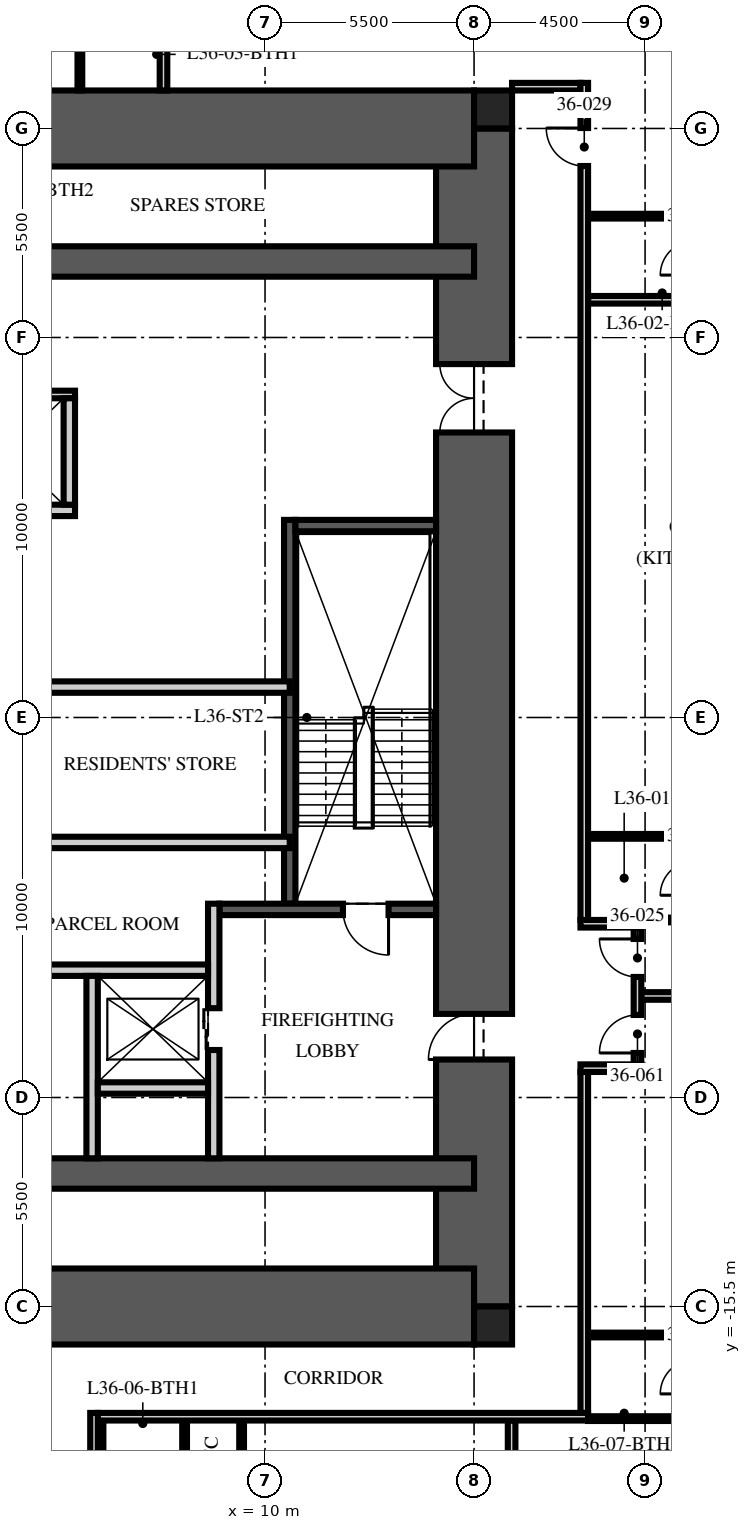
"""IFC4 building model, lengths in metres.
Left out: names, types, materials, properties, quantities, classifications, styles, units other than length and angle.
Written with IfcOpenShell. Run it as: python <this file> out.ifc"""

import sys

from ifc_helpers import new_model, si_unit, direction, frame, frame_2d, origin, origin_2d, place, context, subcontext, project, spatial, rectangle, extrude, element, fill, save


model = new_model("IFC4")
c1 = context("Model", 3, precision=1e-05, world=origin(), true_north=direction((0.0, 1.0)))
c2 = subcontext(c1, "Body", "Model", "MODEL_VIEW")
j1 = project(units=[si_unit("LENGTHUNIT", "METRE"), si_unit("PLANEANGLEUNIT", "RADIAN")], contexts=[c1])
p1 = place(None, origin())
s1 = spatial("IfcSite", under=j1, at=p1, CompositionType="ELEMENT")
p2 = place(p1, origin())
s2 = spatial("IfcBuilding", under=s1, at=p2, CompositionType="ELEMENT")
p3 = place(p2, frame((0.0, 0.0, 144.75)))
s3 = spatial("IfcBuildingStorey", under=s2, at=p3, CompositionType="ELEMENT", Elevation=144.75)
p4 = place(p3, frame((15.5, -15.5, -0.25), z_axis=(0.0, 0.0, 1.0), x_axis=(0.0, 1.0, 0.0)))
e1 = element("IfcWall", 1, at=p4, inside=s3, PredefinedType="SHEAR", context=c2, shape_type="SweptSolid", body=[
    extrude(rectangle(XDim=31.0, YDim=2.0, at=frame_2d((15.5, 0.0))), origin(), (0.0, 0.0, 1.0), 3.75),
])
p5 = place(p4, frame((6.5, 0.0, 0.25)))
e2 = element("IfcOpeningElement", 2, at=p5, cuts=e1, PredefinedType="OPENING", context=c2, shape_type="SweptSolid", body=[
    extrude(rectangle(XDim=1.2, YDim=2.1, at=frame_2d((0.6, 1.05))), frame((0.0, 1.01, 0.0), z_axis=(0.0, -1.0, 0.0), x_axis=(1.0, 0.0, 0.0)), (0.0, 0.0, 1.0), 2.02),
])
p6 = place(p4, frame((23.0, 0.0, 0.25)))
e3 = element("IfcOpeningElement", 3, at=p6, cuts=e1, PredefinedType="OPENING", context=c2, shape_type="SweptSolid", body=[
    extrude(rectangle(XDim=1.8, YDim=2.1, at=frame_2d((0.9, 1.05))), frame((0.0, 1.01, 0.0), z_axis=(0.0, -1.0, 0.0), x_axis=(1.0, 0.0, 0.0)), (0.0, 0.0, 1.0), 2.02),
])
p7 = place(p3, frame((-15.5, 15.5, -0.25), z_axis=(0.0, 0.0, 1.0), x_axis=(1.0, 0.0, 0.0)))
e4 = element("IfcWall", 4, at=p7, inside=s3, PredefinedType="SHEAR", context=c2, shape_type="SweptSolid", body=[
    extrude(rectangle(XDim=31.0, YDim=2.0, at=frame_2d((15.5, 0.0))), origin(), (0.0, 0.0, 1.0), 3.75),
])
p8 = place(p7, frame((5.0, 0.0, 0.25)))
e5 = element("IfcOpeningElement", 5, at=p8, cuts=e4, PredefinedType="OPENING", context=c2, shape_type="SweptSolid", body=[
    extrude(rectangle(XDim=1.0, YDim=2.1, at=frame_2d((0.5, 1.05))), frame((0.0, 1.01, 0.0), z_axis=(0.0, -1.0, 0.0), x_axis=(1.0, 0.0, 0.0)), (0.0, 0.0, 1.0), 2.02),
])
p9 = place(p3, frame((-15.5, -15.5, -0.25), z_axis=(0.0, 0.0, 1.0), x_axis=(1.0, 0.0, 0.0)))
e6 = element("IfcWall", 6, at=p9, inside=s3, PredefinedType="SHEAR", context=c2, shape_type="SweptSolid", body=[
    extrude(rectangle(XDim=31.0, YDim=2.0, at=frame_2d((15.5, 0.0))), origin(), (0.0, 0.0, 1.0), 3.75),
])
p10 = place(p9, frame((10.4, 0.0, 0.25)))
e7 = element("IfcOpeningElement", 7, at=p10, cuts=e6, PredefinedType="OPENING", context=c2, shape_type="SweptSolid", body=[
    extrude(rectangle(XDim=1.1, YDim=2.1, at=frame_2d((0.55, 1.05))), frame((0.0, 1.01, 0.0), z_axis=(0.0, -1.0, 0.0), x_axis=(1.0, 0.0, 0.0)), (0.0, 0.0, 1.0), 2.02),
])
p11 = place(p9, frame((13.5, 0.0, 0.25)))
e8 = element("IfcOpeningElement", 8, at=p11, cuts=e6, PredefinedType="OPENING", context=c2, shape_type="SweptSolid", body=[
    extrude(rectangle(XDim=1.1, YDim=2.1, at=frame_2d((0.55, 1.05))), frame((0.0, 1.01, 0.0), z_axis=(0.0, -1.0, 0.0), x_axis=(1.0, 0.0, 0.0)), (0.0, 0.0, 1.0), 2.02),
])
p12 = place(p9, frame((16.6, 0.0, 0.25)))
e9 = element("IfcOpeningElement", 9, at=p12, cuts=e6, PredefinedType="OPENING", context=c2, shape_type="SweptSolid", body=[
    extrude(rectangle(XDim=1.1, YDim=2.1, at=frame_2d((0.55, 1.05))), frame((0.0, 1.01, 0.0), z_axis=(0.0, -1.0, 0.0), x_axis=(1.0, 0.0, 0.0)), (0.0, 0.0, 1.0), 2.02),
])
for number, where, z_axis, x_axis in (
    (10, (-15.5, 12.0, -0.25), (0.0, 0.0, 1.0), (1.0, 0.0, 0.0)),
    (11, (-15.5, -12.0, -0.25), (0.0, 0.0, 1.0), (1.0, 0.0, 0.0)),
):
    element("IfcWall", number, at=place(p3, frame(where, z_axis=z_axis, x_axis=x_axis)), inside=s3, PredefinedType="SHEAR", context=c2, shape_type="SweptSolid", body=[
        extrude(rectangle(XDim=31.0, YDim=0.8, at=frame_2d((15.5, 0.0))), origin(), (0.0, 0.0, 1.0), 3.75),
    ])
for number, where, z_axis, x_axis in (
    (12, (16.0, 16.0, -0.25), (0.0, 0.0, 1.0), (1.0, 0.0, 0.0)),
    (13, (16.0, -16.0, -0.25), (0.0, 0.0, 1.0), (1.0, 0.0, 0.0)),
):
    element("IfcColumn", number, at=place(p3, frame(where, z_axis=z_axis, x_axis=x_axis)), inside=s3, PredefinedType="COLUMN", context=c2, shape_type="SweptSolid", body=[
        extrude(rectangle(XDim=1.0, YDim=1.0, at=origin_2d()), origin(), (0.0, 0.0, 1.0), 3.75),
    ])
p13 = place(p3, frame((10.65, -4.9, 0.0), z_axis=(0.0, 0.0, 1.0), x_axis=(0.0, 1.0, 0.0)))
e14 = element("IfcWall", 14, at=p13, inside=s3, PredefinedType="SOLIDWALL", context=c2, shape_type="SweptSolid", body=[
    extrude(rectangle(XDim=10.1, YDim=0.3, at=frame_2d((5.05, 0.0))), origin(), (0.0, 0.0, 1.0), 3.5),
])
p14 = place(p3, frame((14.5, -5.05, 0.0), z_axis=(0.0, 0.0, 1.0), x_axis=(-1.0, 0.0, 0.0)))
e15 = element("IfcWall", 15, at=p14, inside=s3, PredefinedType="SOLIDWALL", context=c2, shape_type="SweptSolid", body=[
    extrude(rectangle(XDim=5.7, YDim=0.3, at=frame_2d((2.85, 0.0))), origin(), (0.0, 0.0, 1.0), 3.5),
])
p15 = place(p14, frame((1.25, 0.0, 0.0)))
e16 = element("IfcOpeningElement", 16, at=p15, cuts=e15, PredefinedType="OPENING", context=c2, shape_type="SweptSolid", body=[
    extrude(rectangle(XDim=1.2, YDim=2.1, at=frame_2d((0.6, 1.05))), frame((0.0, 0.16, 0.0), z_axis=(0.0, -1.0, 0.0), x_axis=(1.0, 0.0, 0.0)), (0.0, 0.0, 1.0), 0.32),
])
p16 = place(p3, frame((14.5, 5.05, 0.0), z_axis=(0.0, 0.0, 1.0), x_axis=(-1.0, 0.0, 0.0)))
e17 = element("IfcWall", 17, at=p16, inside=s3, PredefinedType="SOLIDWALL", context=c2, shape_type="SweptSolid", body=[
    extrude(rectangle(XDim=3.7, YDim=0.3, at=frame_2d((1.85, 0.0))), origin(), (0.0, 0.0, 1.0), 3.5),
])
p17 = place(p3, frame((8.65, -11.6, 0.0), z_axis=(0.0, 0.0, 1.0), x_axis=(0.0, 1.0, 0.0)))
e18 = element("IfcWall", 18, at=p17, inside=s3, PredefinedType="PARTITIONING", context=c2, shape_type="SweptSolid", body=[
    extrude(rectangle(XDim=6.7, YDim=0.3, at=frame_2d((3.35, 0.0))), origin(), (0.0, 0.0, 1.0), 3.5),
])
p18 = place(p17, frame((2.85, 0.0, 0.0)))
e19 = element("IfcOpeningElement", 19, at=p18, cuts=e18, PredefinedType="OPENING", context=c2, shape_type="SweptSolid", body=[
    extrude(rectangle(XDim=1.1, YDim=2.1, at=frame_2d((0.55, 1.05))), frame((0.0, 0.16, 0.0), z_axis=(0.0, -1.0, 0.0), x_axis=(1.0, 0.0, 0.0)), (0.0, 0.0, 1.0), 0.32),
])
p19 = place(p3, frame((-8.5, -6.65, 0.0), z_axis=(0.0, 0.0, 1.0), x_axis=(1.0, 0.0, 0.0)))
e20 = element("IfcWall", 20, at=p19, inside=s3, PredefinedType="PARTITIONING", context=c2, shape_type="SweptSolid", body=[
    extrude(rectangle(XDim=17.0, YDim=0.3, at=frame_2d((8.5, 0.0))), origin(), (0.0, 0.0, 1.0), 3.5),
])
p20 = place(p19, frame((7.8, 0.0, 0.0)))
e21 = element("IfcOpeningElement", 21, at=p20, cuts=e20, PredefinedType="OPENING", context=c2, shape_type="SweptSolid", body=[
    extrude(rectangle(XDim=1.3, YDim=2.4, at=frame_2d((0.65, 1.2))), frame((0.0, 0.16, 0.0), z_axis=(0.0, -1.0, 0.0), x_axis=(1.0, 0.0, 0.0)), (0.0, 0.0, 1.0), 0.32),
])
p21 = place(p19, frame((5.65, 0.0, 0.0)))
e22 = element("IfcOpeningElement", 22, at=p21, cuts=e20, PredefinedType="OPENING", context=c2, shape_type="SweptSolid", body=[
    extrude(rectangle(XDim=0.9, YDim=2.1, at=frame_2d((0.45, 1.05))), frame((0.0, 0.16, 0.0), z_axis=(0.0, -1.0, 0.0), x_axis=(1.0, 0.0, 0.0)), (0.0, 0.0, 1.0), 0.32),
])
p22 = place(p19, frame((10.4, 0.0, 0.0)))
e23 = element("IfcOpeningElement", 23, at=p22, cuts=e20, PredefinedType="OPENING", context=c2, shape_type="SweptSolid", body=[
    extrude(rectangle(XDim=0.9, YDim=2.1, at=frame_2d((0.45, 1.05))), frame((0.0, 0.16, 0.0), z_axis=(0.0, -1.0, 0.0), x_axis=(1.0, 0.0, 0.0)), (0.0, 0.0, 1.0), 0.32),
])
p23 = place(p3, frame((5.45, -11.6, 0.0), z_axis=(0.0, 0.0, 1.0), x_axis=(0.0, 1.0, 0.0)))
e24 = element("IfcWall", 24, at=p23, inside=s3, PredefinedType="PARTITIONING", context=c2, shape_type="SweptSolid", body=[
    extrude(rectangle(XDim=4.8, YDim=0.3, at=frame_2d((2.4, 0.0))), origin(), (0.0, 0.0, 1.0), 3.5),
])
p24 = place(p3, frame((5.6, -9.75, 0.0), z_axis=(0.0, 0.0, 1.0), x_axis=(1.0, 0.0, 0.0)))
e25 = element("IfcWall", 25, at=p24, inside=s3, PredefinedType="PARTITIONING", context=c2, shape_type="SweptSolid", body=[
    extrude(rectangle(XDim=2.9, YDim=0.3, at=frame_2d((1.45, 0.0))), origin(), (0.0, 0.0, 1.0), 3.5),
])
p25 = place(p3, frame((-4.7, 5.45, 0.0), z_axis=(0.0, 0.0, 1.0), x_axis=(1.0, 0.0, 0.0)))
e26 = element("IfcWall", 26, at=p25, inside=s3, PredefinedType="PARTITIONING", context=c2, shape_type="SweptSolid", body=[
    extrude(rectangle(XDim=9.7, YDim=0.3, at=frame_2d((4.85, 0.0))), origin(), (0.0, 0.0, 1.0), 3.5),
])
p26 = place(p3, frame((-4.7, 8.5, 0.0), z_axis=(0.0, 0.0, 1.0), x_axis=(1.0, 0.0, 0.0)))
e27 = element("IfcWall", 27, at=p26, inside=s3, PredefinedType="PARTITIONING", context=c2, shape_type="SweptSolid", body=[
    extrude(rectangle(XDim=9.7, YDim=0.2, at=frame_2d((4.85, 0.0))), origin(), (0.0, 0.0, 1.0), 3.5),
])
p27 = place(p3, frame((4.85, 5.6, 0.0), z_axis=(0.0, 0.0, 1.0), x_axis=(0.0, 1.0, 0.0)))
e28 = element("IfcWall", 28, at=p27, inside=s3, PredefinedType="PARTITIONING", context=c2, shape_type="SweptSolid", body=[
    extrude(rectangle(XDim=2.8, YDim=0.3, at=frame_2d((1.4, 0.0))), origin(), (0.0, 0.0, 1.0), 3.5),
])
p28 = place(p3, frame((-10.65, 0.8, 0.0), z_axis=(0.0, 0.0, 1.0), x_axis=(1.0, 0.0, 0.0)))
e29 = element("IfcWall", 29, at=p28, inside=s3, PredefinedType="PARTITIONING", context=c2, shape_type="SweptSolid", body=[
    extrude(rectangle(XDim=21.3, YDim=0.3, at=frame_2d((10.65, 0.0))), origin(), (0.0, 0.0, 1.0), 3.5),
])
p29 = place(p28, frame((10.05, 0.0, 0.0)))
e30 = element("IfcOpeningElement", 30, at=p29, cuts=e29, PredefinedType="OPENING", context=c2, shape_type="SweptSolid", body=[
    extrude(rectangle(XDim=1.2, YDim=2.1, at=frame_2d((0.6, 1.05))), frame((0.0, 0.16, 0.0), z_axis=(0.0, -1.0, 0.0), x_axis=(1.0, 0.0, 0.0)), (0.0, 0.0, 1.0), 0.32),
])
p30 = place(p28, frame((1.74, 0.0, 0.0)))
e31 = element("IfcOpeningElement", 31, at=p30, cuts=e29, PredefinedType="OPENING", context=c2, shape_type="SweptSolid", body=[
    extrude(rectangle(XDim=0.9, YDim=2.1, at=frame_2d((0.45, 1.05))), frame((0.0, 0.16, 0.0), z_axis=(0.0, -1.0, 0.0), x_axis=(1.0, 0.0, 0.0)), (0.0, 0.0, 1.0), 0.32),
])
p31 = place(p3, frame((10.65, -3.288, 0.0), z_axis=(0.0, 0.0, 1.0), x_axis=(-1.0, 0.0, 0.0)))
e32 = element("IfcWall", 32, at=p31, inside=s3, PredefinedType="PARTITIONING", context=c2, shape_type="SweptSolid", body=[
    extrude(rectangle(XDim=7.35, YDim=0.3, at=frame_2d((3.675, 0.0))), origin(), (0.0, 0.0, 1.0), 3.5),
])
p32 = place(p3, frame((16.5, 16.6, 0.0), z_axis=(0.0, 0.0, 1.0), x_axis=(1.0, 0.0, 0.0)))
e33 = element("IfcWall", 33, at=p32, inside=s3, PredefinedType="PARTITIONING", context=c2, shape_type="SweptSolid", body=[
    extrude(rectangle(XDim=1.8, YDim=0.2, at=frame_2d((0.9, 0.0))), origin(), (0.0, 0.0, 1.0), 2.3),
])
p33 = place(p3, frame((19.9, -7.328, 0.0), z_axis=(0.0, 0.0, 1.0), x_axis=(1.0, 0.0, 0.0)))
e34 = element("IfcWall", 34, at=p33, inside=s3, PredefinedType="PARTITIONING", context=c2, shape_type="SweptSolid", body=[
    extrude(rectangle(XDim=8.75, YDim=0.2, at=frame_2d((4.375, 0.0))), origin(), (0.0, 0.0, 1.0), 2.81),
])
p34 = place(p3, frame((18.5, 10.992, 0.0), z_axis=(0.0, 0.0, 1.0), x_axis=(1.0, 0.0, 0.0)))
e35 = element("IfcWall", 35, at=p34, inside=s3, PredefinedType="PARTITIONING", context=c2, shape_type="SweptSolid", body=[
    extrude(rectangle(XDim=10.15, YDim=0.2, at=frame_2d((5.075, 0.0))), origin(), (0.0, 0.0, 1.0), 2.81),
])
p35 = place(p3, frame((7.328, 16.5, 0.0), z_axis=(0.0, 0.0, 1.0), x_axis=(0.0, 1.0, 0.0)))
e36 = element("IfcWall", 36, at=p35, inside=s3, PredefinedType="PARTITIONING", context=c2, shape_type="SweptSolid", body=[
    extrude(rectangle(XDim=12.15, YDim=0.2, at=frame_2d((6.075, 0.0))), origin(), (0.0, 0.0, 1.0), 2.81),
])
p36 = place(p3, frame((16.488, -18.5, 0.0), z_axis=(0.0, 0.0, 1.0), x_axis=(0.0, -1.0, 0.0)))
e37 = element("IfcWall", 37, at=p36, inside=s3, PredefinedType="PARTITIONING", context=c2, shape_type="SweptSolid", body=[
    extrude(rectangle(XDim=10.15, YDim=0.2, at=frame_2d((5.075, 0.0))), origin(), (0.0, 0.0, 1.0), 2.81),
])
p37 = place(p3, frame((19.97, -5.328, 0.0), z_axis=(0.0, 0.0, 1.0), x_axis=(1.0, 0.0, 0.0)))
e38 = element("IfcWall", 38, at=p37, inside=s3, PredefinedType="PARTITIONING", context=c2, shape_type="SweptSolid", body=[
    extrude(rectangle(XDim=1.33, YDim=0.125, at=frame_2d((0.665, 0.0))), origin(), (0.0, 0.0, 1.0), 3.5),
])
for number, where, z_axis, x_axis in (
    (39, (18.5, -3.128, 0.0), (0.0, 0.0, 1.0), (1.0, 0.0, 0.0)),
    (40, (18.5, 13.192, 0.0), (0.0, 0.0, 1.0), (1.0, 0.0, 0.0)),
    (41, (5.128, 16.5, 0.0), (0.0, 0.0, 1.0), (0.0, 1.0, 0.0)),
):
    element("IfcWall", number, at=place(p3, frame(where, z_axis=z_axis, x_axis=x_axis)), inside=s3, PredefinedType="PARTITIONING", context=c2, shape_type="SweptSolid", body=[
        extrude(rectangle(XDim=2.8, YDim=0.125, at=frame_2d((1.4, 0.0))), origin(), (0.0, 0.0, 1.0), 3.5),
    ])
for number, where, z_axis, x_axis in (
    (42, (5.684, -18.5, 0.0), (0.0, 0.0, 1.0), (0.0, -1.0, 0.0)),
    (43, (7.884, -18.5, 0.0), (0.0, 0.0, 1.0), (0.0, -1.0, 0.0)),
    (44, (9.384, -18.5, 0.0), (0.0, 0.0, 1.0), (0.0, -1.0, 0.0)),
):
    element("IfcWall", number, at=place(p3, frame(where, z_axis=z_axis, x_axis=x_axis)), inside=s3, PredefinedType="PARTITIONING", context=c2, shape_type="SweptSolid", body=[
        extrude(rectangle(XDim=4.03, YDim=0.125, at=frame_2d((2.015, 0.0))), origin(), (0.0, 0.0, 1.0), 3.5),
    ])
p38 = place(p3, frame((18.5, -18.45, 0.0), z_axis=(0.0, 0.0, 1.0), x_axis=(1.0, 0.0, 0.0)))
e45 = element("IfcWall", 45, at=p38, inside=s3, PredefinedType="PARTITIONING", context=c2, shape_type="SweptSolid", body=[
    extrude(rectangle(XDim=2.8, YDim=0.125, at=frame_2d((1.4, 0.0))), origin(), (0.0, 0.0, 1.0), 2.3),
])
p39 = place(p3, frame((18.5, -16.25, 0.0), z_axis=(0.0, 0.0, 1.0), x_axis=(1.0, 0.0, 0.0)))
e46 = element("IfcWall", 46, at=p39, inside=s3, PredefinedType="PARTITIONING", context=c2, shape_type="SweptSolid", body=[
    extrude(rectangle(XDim=2.8, YDim=0.125, at=frame_2d((1.4, 0.0))), origin(), (0.0, 0.0, 1.0), 3.5),
])
p40 = place(p3, frame((18.4, -18.3, 0.0), z_axis=(0.0, 0.0, 1.0), x_axis=(0.0, 1.0, 0.0)))
e47 = element("IfcWall", 47, at=p40, inside=s3, PredefinedType="PARTITIONING", context=c2, shape_type="SweptSolid", body=[
    extrude(rectangle(XDim=8.972, YDim=0.2, at=frame_2d((4.486, 0.0))), origin(), (0.0, 0.0, 1.0), 2.3),
])
p41 = place(p3, frame((18.3, -9.228, 0.0), z_axis=(0.0, 0.0, 1.0), x_axis=(1.0, 0.0, 0.0)))
e48 = element("IfcWall", 48, at=p41, inside=s3, PredefinedType="PARTITIONING", context=c2, shape_type="SweptSolid", body=[
    extrude(rectangle(XDim=1.6, YDim=0.2, at=frame_2d((0.8, 0.0))), origin(), (0.0, 0.0, 1.0), 2.7),
])
p42 = place(p3, frame((18.3, -5.428, 0.0), z_axis=(0.0, 0.0, 1.0), x_axis=(1.0, 0.0, 0.0)))
e49 = element("IfcWall", 49, at=p42, inside=s3, PredefinedType="PARTITIONING", context=c2, shape_type="SweptSolid", body=[
    extrude(rectangle(XDim=1.6, YDim=0.2, at=frame_2d((0.8, 0.0))), origin(), (0.0, 0.0, 1.0), 3.5),
])
p43 = place(p3, frame((19.8, -9.128, 0.0), z_axis=(0.0, 0.0, 1.0), x_axis=(0.0, 1.0, 0.0)))
e50 = element("IfcWall", 50, at=p43, inside=s3, PredefinedType="PARTITIONING", context=c2, shape_type="SweptSolid", body=[
    extrude(rectangle(XDim=3.6, YDim=0.2, at=frame_2d((1.8, 0.0))), origin(), (0.0, 0.0, 1.0), 2.7),
])
p44 = place(p43, frame((2.3, 0.0, 0.0)))
e51 = element("IfcOpeningElement", 51, at=p44, cuts=e50, PredefinedType="OPENING", context=c2, shape_type="SweptSolid", body=[
    extrude(rectangle(XDim=1.0, YDim=2.2, at=frame_2d((0.5, 1.1))), frame((0.0, 0.11, 0.0), z_axis=(0.0, -1.0, 0.0), x_axis=(1.0, 0.0, 0.0)), (0.0, 0.0, 1.0), 0.22),
])
p45 = place(p43, frame((0.3, 0.0, 0.0)))
e52 = element("IfcOpeningElement", 52, at=p45, cuts=e50, PredefinedType="OPENING", context=c2, shape_type="SweptSolid", body=[
    extrude(rectangle(XDim=1.0, YDim=2.2, at=frame_2d((0.5, 1.1))), frame((0.0, 0.11, 0.0), z_axis=(0.0, -1.0, 0.0), x_axis=(1.0, 0.0, 0.0)), (0.0, 0.0, 1.0), 0.22),
])
p46 = place(p3, frame((18.4, -5.328, 0.0), z_axis=(0.0, 0.0, 1.0), x_axis=(0.0, 1.0, 0.0)))
e53 = element("IfcWall", 53, at=p46, inside=s3, PredefinedType="PARTITIONING", context=c2, shape_type="SweptSolid", body=[
    extrude(rectangle(XDim=22.028, YDim=0.2, at=frame_2d((11.014, 0.0))), origin(), (0.0, 0.0, 1.0), 2.7),
])
p47 = place(p46, frame((19.84, 0.0, 0.0)))
e54 = element("IfcOpeningElement", 54, at=p47, cuts=e53, PredefinedType="OPENING", context=c2, shape_type="SweptSolid", body=[
    extrude(rectangle(XDim=1.0, YDim=2.2, at=frame_2d((0.5, 1.1))), frame((0.0, 0.11, 0.0), z_axis=(0.0, -1.0, 0.0), x_axis=(1.0, 0.0, 0.0)), (0.0, 0.0, 1.0), 0.22),
])
p48 = place(p3, frame((18.5, -18.4, 0.0), z_axis=(0.0, 0.0, 1.0), x_axis=(-1.0, 0.0, 0.0)))
e55 = element("IfcWall", 55, at=p48, inside=s3, PredefinedType="PARTITIONING", context=c2, shape_type="SweptSolid", body=[
    extrude(rectangle(XDim=12.9, YDim=0.2, at=frame_2d((6.45, 0.0))), origin(), (0.0, 0.0, 1.0), 2.3),
])
p49 = place(p3, frame((5.5, -18.3, 0.0), z_axis=(0.0, 0.0, 1.0), x_axis=(0.0, -1.0, 0.0)))
e56 = element("IfcWall", 56, at=p49, inside=s3, PredefinedType="PARTITIONING", context=c2, shape_type="SweptSolid", body=[
    extrude(rectangle(XDim=3.0, YDim=0.2, at=frame_2d((1.5, 0.0))), origin(), (0.0, 0.0, 1.0), 3.5),
])
p50 = place(p15, origin())
e57 = element("IfcDoor", 57, at=p50, inside=s3, OperationType="SINGLE_SWING_LEFT", PredefinedType="DOOR", context=c2, shape_type="SweptSolid", body=[
    extrude(rectangle(XDim=1.2, YDim=2.1, at=frame_2d((0.6, 1.05))), frame((0.0, 0.025, 0.0), z_axis=(0.0, -1.0, 0.0), x_axis=(1.0, 0.0, 0.0)), (0.0, 0.0, 1.0), 0.05),
])
fill(e16, e57)
p51 = place(p5, origin())
e58 = element("IfcDoor", 58, at=p51, inside=s3, OperationType="SINGLE_SWING_LEFT", PredefinedType="DOOR", context=c2, shape_type="SweptSolid", body=[
    extrude(rectangle(XDim=1.2, YDim=2.1, at=frame_2d((0.6, 1.05))), frame((0.0, 0.025, 0.0), z_axis=(0.0, -1.0, 0.0), x_axis=(1.0, 0.0, 0.0)), (0.0, 0.0, 1.0), 0.05),
])
fill(e2, e58)
p52 = place(p6, origin())
e59 = element("IfcDoor", 59, at=p52, inside=s3, OperationType="DOUBLE_DOOR_SINGLE_SWING", PredefinedType="DOOR", context=c2, shape_type="SweptSolid", body=[
    extrude(rectangle(XDim=1.8, YDim=2.1, at=frame_2d((0.9, 1.05))), frame((0.0, 0.025, 0.0), z_axis=(0.0, -1.0, 0.0), x_axis=(1.0, 0.0, 0.0)), (0.0, 0.0, 1.0), 0.05),
])
fill(e3, e59)
p53 = place(p18, origin())
e60 = element("IfcDoor", 60, at=p53, inside=s3, OperationType="DOUBLE_DOOR_SLIDING", PredefinedType="DOOR", context=c2, shape_type="SweptSolid", body=[
    extrude(rectangle(XDim=1.1, YDim=2.1, at=frame_2d((0.55, 1.05))), frame((0.0, 0.025, 0.0), z_axis=(0.0, -1.0, 0.0), x_axis=(1.0, 0.0, 0.0)), (0.0, 0.0, 1.0), 0.05),
])
fill(e19, e60)
p54 = place(p44, origin())
e61 = element("IfcDoor", 61, at=p54, inside=s3, OperationType="SINGLE_SWING_RIGHT", PredefinedType="DOOR", context=c2, shape_type="SweptSolid", body=[
    extrude(rectangle(XDim=1.0, YDim=2.2, at=frame_2d((0.5, 1.1))), frame((0.0, 0.025, 0.0), z_axis=(0.0, -1.0, 0.0), x_axis=(1.0, 0.0, 0.0)), (0.0, 0.0, 1.0), 0.05),
])
fill(e51, e61)
p55 = place(p47, origin())
e62 = element("IfcDoor", 62, at=p55, inside=s3, OperationType="SINGLE_SWING_RIGHT", PredefinedType="DOOR", context=c2, shape_type="SweptSolid", body=[
    extrude(rectangle(XDim=1.0, YDim=2.2, at=frame_2d((0.5, 1.1))), frame((0.0, 0.025, 0.0), z_axis=(0.0, -1.0, 0.0), x_axis=(1.0, 0.0, 0.0)), (0.0, 0.0, 1.0), 0.05),
])
fill(e54, e62)
p56 = place(p45, origin())
e63 = element("IfcDoor", 63, at=p56, inside=s3, OperationType="SINGLE_SWING_LEFT", PredefinedType="DOOR", context=c2, shape_type="SweptSolid", body=[
    extrude(rectangle(XDim=1.0, YDim=2.2, at=frame_2d((0.5, 1.1))), frame((0.0, 0.025, 0.0), z_axis=(0.0, -1.0, 0.0), x_axis=(1.0, 0.0, 0.0)), (0.0, 0.0, 1.0), 0.05),
])
fill(e52, e63)
save(model, sys.argv[1])
